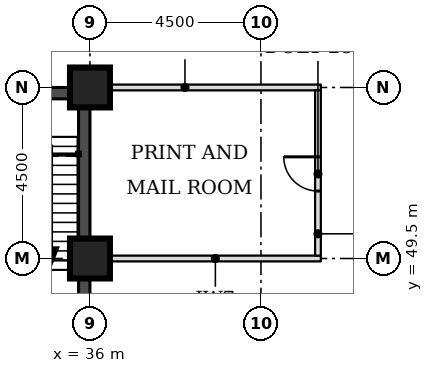
"""IFC4 building model, lengths in metres.
Left out: names, types, materials, properties, quantities, classifications, styles, units other than length and angle.
Written with IfcOpenShell. Run it as: python <this file> out.ifc"""

import sys

from ifc_helpers import new_model, si_unit, direction, frame, frame_2d, origin, origin_2d, place, context, subcontext, project, spatial, rectangle, extrude, element, fill, save


model = new_model("IFC4")
c1 = context("Model", 3, precision=1e-05, world=origin(), true_north=direction((0.0, 1.0)))
c2 = subcontext(c1, "Body", "Model", "MODEL_VIEW")
j1 = project(units=[si_unit("LENGTHUNIT", "METRE"), si_unit("PLANEANGLEUNIT", "RADIAN")], contexts=[c1])
p1 = place(None, origin())
s1 = spatial("IfcSite", under=j1, at=p1, CompositionType="ELEMENT")
p2 = place(p1, origin())
s2 = spatial("IfcBuilding", under=s1, at=p2, CompositionType="ELEMENT")
p3 = place(p2, frame((0.0, 0.0, 78.9)))
s3 = spatial("IfcBuildingStorey", under=s2, at=p3, CompositionType="ELEMENT", Elevation=78.9)
for number, where, z_axis, x_axis in (
    (1, (36.0, 49.5, 0.0), (0.0, 0.0, 1.0), (1.0, 0.0, 0.0)),
    (2, (36.0, 54.0, 0.0), (0.0, 0.0, 1.0), (1.0, 0.0, 0.0)),
):
    element("IfcColumn", number, at=place(p3, frame(where, z_axis=z_axis, x_axis=x_axis)), inside=s3, PredefinedType="COLUMN", context=c2, shape_type="SweptSolid", body=[
        extrude(rectangle(XDim=1.05, YDim=1.05, at=origin_2d()), origin(), (0.0, 0.0, 1.0), 3.7),
    ])
p4 = place(p3, frame((27.3, 53.85, 0.0), z_axis=(0.0, 0.0, 1.0), x_axis=(1.0, 0.0, 0.0)))
e3 = element("IfcWall", 3, at=p4, inside=s3, PredefinedType="SHEAR", context=c2, shape_type="SweptSolid", body=[
    extrude(rectangle(XDim=8.4, YDim=0.3, at=frame_2d((4.2, 0.0))), origin(), (0.0, 0.0, 1.0), 3.7),
])
p5 = place(p4, frame((6.4, 0.0, 0.0)))
e4 = element("IfcOpeningElement", 4, at=p5, cuts=e3, PredefinedType="OPENING", context=c2, shape_type="SweptSolid", body=[
    extrude(rectangle(XDim=1.1, YDim=2.1, at=frame_2d((0.55, 1.05))), frame((0.0, 0.16, 0.0), z_axis=(0.0, -1.0, 0.0), x_axis=(1.0, 0.0, 0.0)), (0.0, 0.0, 1.0), 0.32),
])
p6 = place(p3, frame((35.85, 45.0, 0.0), z_axis=(0.0, 0.0, 1.0), x_axis=(0.0, 1.0, 0.0)))
e5 = element("IfcWall", 5, at=p6, inside=s3, PredefinedType="SHEAR", context=c2, shape_type="SweptSolid", body=[
    extrude(rectangle(XDim=9.0, YDim=0.3, at=frame_2d((4.5, 0.0))), origin(), (0.0, 0.0, 1.0), 3.7),
])
for number, where, z_axis, x_axis in (
    (6, (36.525, 49.5, 0.0), (0.0, 0.0, 1.0), (1.0, 0.0, 0.0)),
    (7, (36.525, 54.0, 0.0), (0.0, 0.0, 1.0), (1.0, 0.0, 0.0)),
):
    element("IfcWall", number, at=place(p3, frame(where, z_axis=z_axis, x_axis=x_axis)), inside=s3, PredefinedType="PARTITIONING", context=c2, shape_type="SweptSolid", body=[
        extrude(rectangle(XDim=5.55, YDim=0.15, at=frame_2d((2.775, 0.0))), origin(), (0.0, 0.0, 1.0), 3.55),
    ])
p7 = place(p3, frame((42.0, 49.575, 0.0), z_axis=(0.0, 0.0, 1.0), x_axis=(0.0, 1.0, 0.0)))
e8 = element("IfcWall", 8, at=p7, inside=s3, PredefinedType="PARTITIONING", context=c2, shape_type="SweptSolid", body=[
    extrude(rectangle(XDim=4.35, YDim=0.15, at=frame_2d((2.175, 0.0))), origin(), (0.0, 0.0, 1.0), 3.55),
])
p8 = place(p7, frame((1.7, 0.0, 0.0)))
e9 = element("IfcOpeningElement", 9, at=p8, cuts=e8, PredefinedType="OPENING", context=c2, shape_type="SweptSolid", body=[
    extrude(rectangle(XDim=0.9, YDim=2.1, at=frame_2d((0.45, 1.05))), frame((0.0, 0.085, 0.0), z_axis=(0.0, -1.0, 0.0), x_axis=(1.0, 0.0, 0.0)), (0.0, 0.0, 1.0), 0.17),
])
p9 = place(p8, origin())
e10 = element("IfcDoor", 10, at=p9, inside=s3, OperationType="SINGLE_SWING_RIGHT", PredefinedType="DOOR", context=c2, shape_type="SweptSolid", body=[
    extrude(rectangle(XDim=0.9, YDim=2.1, at=frame_2d((0.45, 1.05))), frame((0.0, 0.025, 0.0), z_axis=(0.0, -1.0, 0.0), x_axis=(1.0, 0.0, 0.0)), (0.0, 0.0, 1.0), 0.05),
])
fill(e9, e10)
save(model, sys.argv[1])
